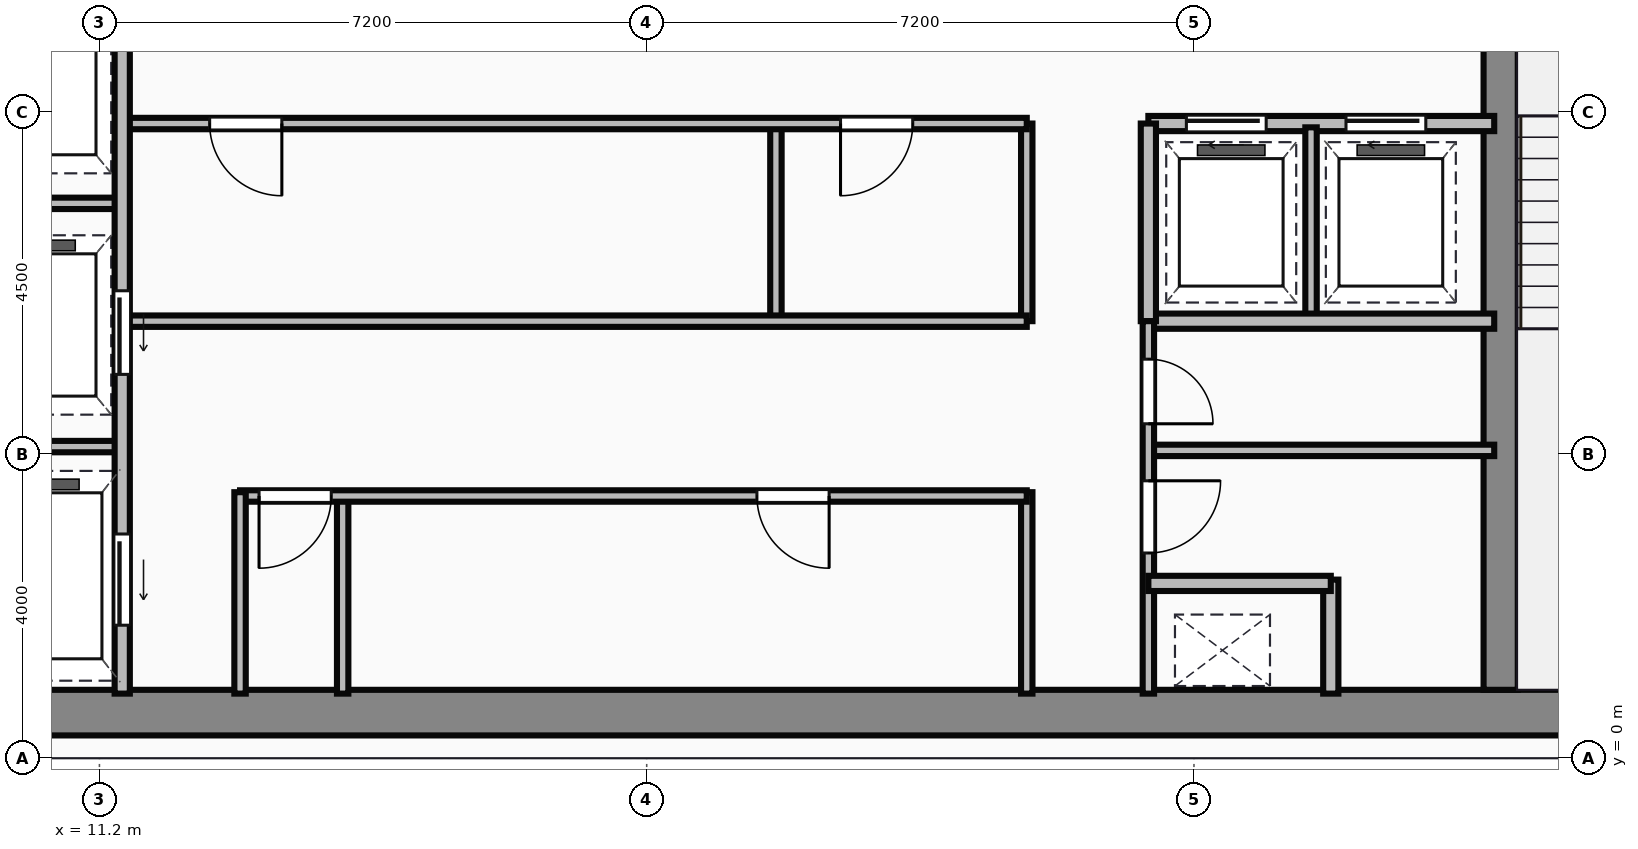
"""IFC4 building model, lengths in metres.
Left out: names, types, materials, properties, quantities, classifications, styles, units other than length and angle.
Written with IfcOpenShell. Run it as: python <this file> out.ifc"""

import sys

from ifc_helpers import new_model, si_unit, direction, frame, frame_2d, origin, place, context, subcontext, project, spatial, rectangle, extrude, source, transform, mapped, element, fill, save


model = new_model("IFC4")
c1 = context("Model", 3, precision=1e-05, world=origin(), true_north=direction((0.0, 1.0)))
c2 = subcontext(c1, "Body", "Model", "MODEL_VIEW")
j1 = project(units=[si_unit("LENGTHUNIT", "METRE"), si_unit("PLANEANGLEUNIT", "RADIAN")], contexts=[c1])
p1 = place(None, origin())
s1 = spatial("IfcSite", under=j1, at=p1, CompositionType="ELEMENT")
p2 = place(p1, origin())
s2 = spatial("IfcBuilding", under=s1, at=p2, CompositionType="ELEMENT")
p3 = place(p2, frame((0.0, 0.0, 244.2)))
s3 = spatial("IfcBuildingStorey", under=s2, at=p3, CompositionType="ELEMENT", Elevation=244.2)
m1 = source(origin(), c2, "Body", "SweptSolid", [
    extrude(rectangle(XDim=29.5, YDim=0.6, at=frame_2d((14.75, 0.0))), origin(), (0.0, 0.0, 1.0), 3.65),
])
p4 = place(p3, frame((4.5, 0.6, 0.0), z_axis=(0.0, 0.0, 1.0), x_axis=(1.0, 0.0, 0.0)))
e1 = element("IfcWall", 1, at=p4, inside=s3, PredefinedType="SHEAR", context=c2, shape_type="MappedRepresentation", body=[
    mapped(m1, transform((0.0, 0.0, 0.0))),
])
m2 = source(origin(), c2, "Body", "SweptSolid", [
    extrude(rectangle(XDim=12.5, YDim=0.45, at=frame_2d((6.25, 0.0))), origin(), (0.0, 0.0, 1.0), 3.65),
])
p5 = place(p3, frame((29.635, 0.9, 0.0), z_axis=(0.0, 0.0, 1.0), x_axis=(0.0, 1.0, 0.0)))
e2 = element("IfcWall", 2, at=p5, inside=s3, PredefinedType="SHEAR", context=c2, shape_type="MappedRepresentation", body=[
    mapped(m2, transform((0.0, 0.0, 0.0))),
])
m3 = source(origin(), c2, "Body", "SweptSolid", [
    extrude(rectangle(XDim=9.6, YDim=0.2, at=frame_2d((4.8, 0.0))), origin(), (0.0, 0.0, 1.0), 3.4),
])
p6 = place(p3, frame((11.5, 0.85, 0.0), z_axis=(0.0, 0.0, 1.0), x_axis=(0.0, 1.0, 0.0)))
e3 = element("IfcWall", 3, at=p6, inside=s3, PredefinedType="PARTITIONING", context=c2, shape_type="MappedRepresentation", body=[
    mapped(m3, transform((0.0, 0.0, 0.0))),
])
p7 = place(p6, frame((4.2, 0.0, 0.0)))
e4 = element("IfcOpeningElement", 4, at=p7, cuts=e3, PredefinedType="OPENING", context=c2, shape_type="SweptSolid", body=[
    extrude(rectangle(XDim=1.1, YDim=2.15, at=frame_2d((0.55, 1.075))), frame((0.0, 0.11, 0.0), z_axis=(0.0, -1.0, 0.0), x_axis=(1.0, 0.0, 0.0)), (0.0, 0.0, 1.0), 0.22),
])
p8 = place(p6, frame((0.9, 0.0, 0.0)))
e5 = element("IfcOpeningElement", 5, at=p8, cuts=e3, PredefinedType="OPENING", context=c2, shape_type="SweptSolid", body=[
    extrude(rectangle(XDim=1.2, YDim=2.15, at=frame_2d((0.6, 1.075))), frame((0.0, 0.11, 0.0), z_axis=(0.0, -1.0, 0.0), x_axis=(1.0, 0.0, 0.0)), (0.0, 0.0, 1.0), 0.22),
])
m4 = source(origin(), c2, "Body", "SweptSolid", [
    extrude(rectangle(XDim=2.4, YDim=0.15, at=frame_2d((1.2, 0.0))), origin(), (0.0, 0.0, 1.0), 3.4),
])
for number, where, z_axis, x_axis in (
    (6, (9.1, 4.1, 0.0), (0.0, 0.0, 1.0), (1.0, 0.0, 0.0)),
    (7, (9.1, 7.3, 0.0), (0.0, 0.0, 1.0), (1.0, 0.0, 0.0)),
):
    element("IfcWall", number, at=place(p3, frame(where, z_axis=z_axis, x_axis=x_axis)), inside=s3, PredefinedType="PARTITIONING", context=c2, shape_type="MappedRepresentation", body=[
        mapped(m4, transform((0.0, 0.0, 0.0))),
    ])
m5 = source(origin(), c2, "Body", "SweptSolid", [
    extrude(rectangle(XDim=2.65, YDim=0.15, at=frame_2d((1.325, 0.0))), origin(), (0.0, 0.0, 1.0), 3.4),
])
p9 = place(p3, frame((13.05, 0.85, 0.0), z_axis=(0.0, 0.0, 1.0), x_axis=(0.0, 1.0, 0.0)))
e8 = element("IfcWall", 8, at=p9, inside=s3, PredefinedType="PARTITIONING", context=c2, shape_type="MappedRepresentation", body=[
    mapped(m5, transform((0.0, 0.0, 0.0))),
])
m6 = source(origin(), c2, "Body", "SweptSolid", [
    extrude(rectangle(XDim=10.35, YDim=0.15, at=frame_2d((5.175, 0.0))), origin(), (0.0, 0.0, 1.0), 3.4),
])
p10 = place(p3, frame((13.05, 3.45, 0.0), z_axis=(0.0, 0.0, 1.0), x_axis=(1.0, 0.0, 0.0)))
e9 = element("IfcWall", 9, at=p10, inside=s3, PredefinedType="PARTITIONING", context=c2, shape_type="MappedRepresentation", body=[
    mapped(m6, transform((0.0, 0.0, 0.0))),
])
p11 = place(p10, frame((0.25, 0.0, 0.0)))
e10 = element("IfcOpeningElement", 10, at=p11, cuts=e9, PredefinedType="OPENING", context=c2, shape_type="SweptSolid", body=[
    extrude(rectangle(XDim=0.95, YDim=2.15, at=frame_2d((0.475, 1.075))), frame((0.0, 0.085, 0.0), z_axis=(0.0, -1.0, 0.0), x_axis=(1.0, 0.0, 0.0)), (0.0, 0.0, 1.0), 0.17),
])
p12 = place(p10, frame((6.8, 0.0, 0.0)))
e11 = element("IfcOpeningElement", 11, at=p12, cuts=e9, PredefinedType="OPENING", context=c2, shape_type="SweptSolid", body=[
    extrude(rectangle(XDim=0.95, YDim=2.15, at=frame_2d((0.475, 1.075))), frame((0.0, 0.085, 0.0), z_axis=(0.0, -1.0, 0.0), x_axis=(1.0, 0.0, 0.0)), (0.0, 0.0, 1.0), 0.17),
])
p13 = place(p3, frame((23.4, 0.85, 0.0), z_axis=(0.0, 0.0, 1.0), x_axis=(0.0, 1.0, 0.0)))
e12 = element("IfcWall", 12, at=p13, inside=s3, PredefinedType="PARTITIONING", context=c2, shape_type="MappedRepresentation", body=[
    mapped(m5, transform((0.0, 0.0, 0.0))),
])
m7 = source(origin(), c2, "Body", "SweptSolid", [
    extrude(rectangle(XDim=2.6, YDim=0.15, at=frame_2d((1.3, 0.0))), origin(), (0.0, 0.0, 1.0), 3.4),
])
p14 = place(p3, frame((14.4, 0.85, 0.0), z_axis=(0.0, 0.0, 1.0), x_axis=(0.0, 1.0, 0.0)))
e13 = element("IfcWall", 13, at=p14, inside=s3, PredefinedType="PARTITIONING", context=c2, shape_type="MappedRepresentation", body=[
    mapped(m7, transform((0.0, 0.0, 0.0))),
])
m8 = source(origin(), c2, "Body", "SweptSolid", [
    extrude(rectangle(XDim=11.85, YDim=0.15, at=frame_2d((5.925, 0.0))), origin(), (0.0, 0.0, 1.0), 3.4),
])
p15 = place(p3, frame((11.55, 5.75, 0.0), z_axis=(0.0, 0.0, 1.0), x_axis=(1.0, 0.0, 0.0)))
e14 = element("IfcWall", 14, at=p15, inside=s3, PredefinedType="PARTITIONING", context=c2, shape_type="MappedRepresentation", body=[
    mapped(m8, transform((0.0, 0.0, 0.0))),
])
p16 = place(p3, frame((11.55, 8.35, 0.0), z_axis=(0.0, 0.0, 1.0), x_axis=(1.0, 0.0, 0.0)))
e15 = element("IfcWall", 15, at=p16, inside=s3, PredefinedType="PARTITIONING", context=c2, shape_type="MappedRepresentation", body=[
    mapped(m8, transform((0.0, 0.0, 0.0))),
])
p17 = place(p16, frame((1.1, 0.0, 0.0)))
e16 = element("IfcOpeningElement", 16, at=p17, cuts=e15, PredefinedType="OPENING", context=c2, shape_type="SweptSolid", body=[
    extrude(rectangle(XDim=0.95, YDim=2.15, at=frame_2d((0.475, 1.075))), frame((0.0, 0.085, 0.0), z_axis=(0.0, -1.0, 0.0), x_axis=(1.0, 0.0, 0.0)), (0.0, 0.0, 1.0), 0.17),
])
p18 = place(p16, frame((9.4, 0.0, 0.0)))
e17 = element("IfcOpeningElement", 17, at=p18, cuts=e15, PredefinedType="OPENING", context=c2, shape_type="SweptSolid", body=[
    extrude(rectangle(XDim=0.95, YDim=2.15, at=frame_2d((0.475, 1.075))), frame((0.0, 0.085, 0.0), z_axis=(0.0, -1.0, 0.0), x_axis=(1.0, 0.0, 0.0)), (0.0, 0.0, 1.0), 0.17),
])
m9 = source(origin(), c2, "Body", "SweptSolid", [
    extrude(rectangle(XDim=2.6, YDim=0.15, at=frame_2d((1.3, 0.0))), origin(), (0.0, 0.0, 1.0), 3.4),
])
p19 = place(p3, frame((23.4, 5.75, 0.0), z_axis=(0.0, 0.0, 1.0), x_axis=(0.0, 1.0, 0.0)))
e18 = element("IfcWall", 18, at=p19, inside=s3, PredefinedType="PARTITIONING", context=c2, shape_type="MappedRepresentation", body=[
    mapped(m9, transform((0.0, 0.0, 0.0))),
])
m10 = source(origin(), c2, "Body", "SweptSolid", [
    extrude(rectangle(XDim=2.5, YDim=0.15, at=frame_2d((1.25, 0.0))), origin(), (0.0, 0.0, 1.0), 3.4),
])
p20 = place(p3, frame((20.1, 5.8, 0.0), z_axis=(0.0, 0.0, 1.0), x_axis=(0.0, 1.0, 0.0)))
e19 = element("IfcWall", 19, at=p20, inside=s3, PredefinedType="PARTITIONING", context=c2, shape_type="MappedRepresentation", body=[
    mapped(m10, transform((0.0, 0.0, 0.0))),
])
m11 = source(origin(), c2, "Body", "SweptSolid", [
    extrude(rectangle(XDim=4.55, YDim=0.2, at=frame_2d((2.275, 0.0))), origin(), (0.0, 0.0, 1.0), 3.4),
])
p21 = place(p3, frame((25.0, 8.35, 0.0), z_axis=(0.0, 0.0, 1.0), x_axis=(1.0, 0.0, 0.0)))
e20 = element("IfcWall", 20, at=p21, inside=s3, PredefinedType="PARTITIONING", context=c2, shape_type="MappedRepresentation", body=[
    mapped(m11, transform((0.0, 0.0, 0.0))),
])
p22 = place(p21, frame((0.5, 0.0, 0.0)))
e21 = element("IfcOpeningElement", 21, at=p22, cuts=e20, PredefinedType="OPENING", context=c2, shape_type="SweptSolid", body=[
    extrude(rectangle(XDim=1.05, YDim=2.15, at=frame_2d((0.525, 1.075))), frame((0.0, 0.11, 0.0), z_axis=(0.0, -1.0, 0.0), x_axis=(1.0, 0.0, 0.0)), (0.0, 0.0, 1.0), 0.22),
])
p23 = place(p21, frame((2.6, 0.0, 0.0)))
e22 = element("IfcOpeningElement", 22, at=p23, cuts=e20, PredefinedType="OPENING", context=c2, shape_type="SweptSolid", body=[
    extrude(rectangle(XDim=1.05, YDim=2.15, at=frame_2d((0.525, 1.075))), frame((0.0, 0.11, 0.0), z_axis=(0.0, -1.0, 0.0), x_axis=(1.0, 0.0, 0.0)), (0.0, 0.0, 1.0), 0.22),
])
p24 = place(p3, frame((25.0, 5.75, 0.0), z_axis=(0.0, 0.0, 1.0), x_axis=(1.0, 0.0, 0.0)))
e23 = element("IfcWall", 23, at=p24, inside=s3, PredefinedType="PARTITIONING", context=c2, shape_type="MappedRepresentation", body=[
    mapped(m11, transform((0.0, 0.0, 0.0))),
])
m12 = source(origin(), c2, "Body", "SweptSolid", [
    extrude(rectangle(XDim=2.6, YDim=0.2, at=frame_2d((1.3, 0.0))), origin(), (0.0, 0.0, 1.0), 3.4),
])
p25 = place(p3, frame((25.0, 5.75, 0.0), z_axis=(0.0, 0.0, 1.0), x_axis=(0.0, 1.0, 0.0)))
e24 = element("IfcWall", 24, at=p25, inside=s3, PredefinedType="PARTITIONING", context=c2, shape_type="MappedRepresentation", body=[
    mapped(m12, transform((0.0, 0.0, 0.0))),
])
p26 = place(p3, frame((27.14, 5.8, 0.0), z_axis=(0.0, 0.0, 1.0), x_axis=(0.0, 1.0, 0.0)))
e25 = element("IfcWall", 25, at=p26, inside=s3, PredefinedType="PARTITIONING", context=c2, shape_type="MappedRepresentation", body=[
    mapped(m10, transform((0.0, 0.0, 0.0))),
])
m13 = source(origin(), c2, "Body", "SweptSolid", [
    extrude(rectangle(XDim=4.9, YDim=0.15, at=frame_2d((2.45, 0.0))), origin(), (0.0, 0.0, 1.0), 3.4),
])
p27 = place(p3, frame((25.0, 0.85, 0.0), z_axis=(0.0, 0.0, 1.0), x_axis=(0.0, 1.0, 0.0)))
e26 = element("IfcWall", 26, at=p27, inside=s3, PredefinedType="PARTITIONING", context=c2, shape_type="MappedRepresentation", body=[
    mapped(m13, transform((0.0, 0.0, 0.0))),
])
p28 = place(p27, frame((1.85, 0.0, 0.0)))
e27 = element("IfcOpeningElement", 27, at=p28, cuts=e26, PredefinedType="OPENING", context=c2, shape_type="SweptSolid", body=[
    extrude(rectangle(XDim=0.95, YDim=2.15, at=frame_2d((0.475, 1.075))), frame((0.0, 0.085, 0.0), z_axis=(0.0, -1.0, 0.0), x_axis=(1.0, 0.0, 0.0)), (0.0, 0.0, 1.0), 0.17),
])
p29 = place(p27, frame((3.55, 0.0, 0.0)))
e28 = element("IfcOpeningElement", 28, at=p29, cuts=e26, PredefinedType="OPENING", context=c2, shape_type="SweptSolid", body=[
    extrude(rectangle(XDim=0.85, YDim=2.15, at=frame_2d((0.425, 1.075))), frame((0.0, 0.085, 0.0), z_axis=(0.0, -1.0, 0.0), x_axis=(1.0, 0.0, 0.0)), (0.0, 0.0, 1.0), 0.17),
])
m14 = source(origin(), c2, "Body", "SweptSolid", [
    extrude(rectangle(XDim=2.4, YDim=0.2, at=frame_2d((1.2, 0.0))), origin(), (0.0, 0.0, 1.0), 3.4),
])
p30 = place(p3, frame((25.0, 2.3, 0.0), z_axis=(0.0, 0.0, 1.0), x_axis=(1.0, 0.0, 0.0)))
e29 = element("IfcWall", 29, at=p30, inside=s3, PredefinedType="PARTITIONING", context=c2, shape_type="MappedRepresentation", body=[
    mapped(m14, transform((0.0, 0.0, 0.0))),
])
m15 = source(origin(), c2, "Body", "SweptSolid", [
    extrude(rectangle(XDim=1.5, YDim=0.2, at=frame_2d((0.75, 0.0))), origin(), (0.0, 0.0, 1.0), 3.4),
])
p31 = place(p3, frame((27.4, 0.85, 0.0), z_axis=(0.0, 0.0, 1.0), x_axis=(0.0, 1.0, 0.0)))
e30 = element("IfcWall", 30, at=p31, inside=s3, PredefinedType="PARTITIONING", context=c2, shape_type="MappedRepresentation", body=[
    mapped(m15, transform((0.0, 0.0, 0.0))),
])
m16 = source(origin(), c2, "Body", "SweptSolid", [
    extrude(rectangle(XDim=4.55, YDim=0.15, at=frame_2d((2.275, 0.0))), origin(), (0.0, 0.0, 1.0), 3.4),
])
p32 = place(p3, frame((25.0, 4.05, 0.0), z_axis=(0.0, 0.0, 1.0), x_axis=(1.0, 0.0, 0.0)))
e31 = element("IfcWall", 31, at=p32, inside=s3, PredefinedType="PARTITIONING", context=c2, shape_type="MappedRepresentation", body=[
    mapped(m16, transform((0.0, 0.0, 0.0))),
])
m17 = source(origin(), c2, "Body", "SweptSolid", [
    extrude(rectangle(XDim=1.1, YDim=2.15, at=frame_2d((0.55, 1.075))), frame((0.0, 0.025, 0.0), z_axis=(0.0, -1.0, 0.0), x_axis=(1.0, 0.0, 0.0)), (0.0, 0.0, 1.0), 0.05),
])
p33 = place(p7, frame((1.1, 0.0, 0.0), z_axis=(0.0, 0.0, 1.0), x_axis=(-1.0, 0.0, 0.0)))
e32 = element("IfcDoor", 32, at=p33, inside=s3, OperationType="SLIDING_TO_LEFT", PredefinedType="DOOR", context=c2, shape_type="MappedRepresentation", body=[
    mapped(m17, transform((0.0, 0.0, 0.0))),
])
fill(e4, e32)
m18 = source(origin(), c2, "Body", "SweptSolid", [
    extrude(rectangle(XDim=1.2, YDim=2.15, at=frame_2d((0.6, 1.075))), frame((0.0, 0.025, 0.0), z_axis=(0.0, -1.0, 0.0), x_axis=(1.0, 0.0, 0.0)), (0.0, 0.0, 1.0), 0.05),
])
p34 = place(p8, frame((1.2, 0.0, 0.0), z_axis=(0.0, 0.0, 1.0), x_axis=(-1.0, 0.0, 0.0)))
e33 = element("IfcDoor", 33, at=p34, inside=s3, OperationType="SLIDING_TO_LEFT", PredefinedType="DOOR", context=c2, shape_type="MappedRepresentation", body=[
    mapped(m18, transform((0.0, 0.0, 0.0))),
])
fill(e5, e33)
m19 = source(origin(), c2, "Body", "SweptSolid", [
    extrude(rectangle(XDim=0.95, YDim=2.15, at=frame_2d((0.475, 1.075))), frame((0.0, 0.025, 0.0), z_axis=(0.0, -1.0, 0.0), x_axis=(1.0, 0.0, 0.0)), (0.0, 0.0, 1.0), 0.05),
])
p35 = place(p11, origin())
e34 = element("IfcDoor", 34, at=p35, inside=s3, OperationType="SINGLE_SWING_LEFT", PredefinedType="DOOR", context=c2, shape_type="MappedRepresentation", body=[
    mapped(m19, transform((0.0, 0.0, 0.0))),
])
fill(e10, e34)
p36 = place(p12, origin())
e35 = element("IfcDoor", 35, at=p36, inside=s3, OperationType="SINGLE_SWING_RIGHT", PredefinedType="DOOR", context=c2, shape_type="MappedRepresentation", body=[
    mapped(m19, transform((0.0, 0.0, 0.0))),
])
fill(e11, e35)
p37 = place(p17, origin())
e36 = element("IfcDoor", 36, at=p37, inside=s3, OperationType="SINGLE_SWING_RIGHT", PredefinedType="DOOR", context=c2, shape_type="MappedRepresentation", body=[
    mapped(m19, transform((0.0, 0.0, 0.0))),
])
fill(e16, e36)
p38 = place(p18, origin())
e37 = element("IfcDoor", 37, at=p38, inside=s3, OperationType="SINGLE_SWING_LEFT", PredefinedType="DOOR", context=c2, shape_type="MappedRepresentation", body=[
    mapped(m19, transform((0.0, 0.0, 0.0))),
])
fill(e17, e37)
m20 = source(origin(), c2, "Body", "SweptSolid", [
    extrude(rectangle(XDim=1.05, YDim=2.15, at=frame_2d((0.525, 1.075))), frame((0.0, 0.025, 0.0), z_axis=(0.0, -1.0, 0.0), x_axis=(1.0, 0.0, 0.0)), (0.0, 0.0, 1.0), 0.05),
])
p39 = place(p22, origin())
e38 = element("IfcDoor", 38, at=p39, inside=s3, OperationType="SLIDING_TO_LEFT", PredefinedType="DOOR", context=c2, shape_type="MappedRepresentation", body=[
    mapped(m20, transform((0.0, 0.0, 0.0))),
])
fill(e21, e38)
p40 = place(p23, origin())
e39 = element("IfcDoor", 39, at=p40, inside=s3, OperationType="SLIDING_TO_LEFT", PredefinedType="DOOR", context=c2, shape_type="MappedRepresentation", body=[
    mapped(m20, transform((0.0, 0.0, 0.0))),
])
fill(e22, e39)
p41 = place(p28, origin())
e40 = element("IfcDoor", 40, at=p41, inside=s3, OperationType="SINGLE_SWING_RIGHT", PredefinedType="DOOR", context=c2, shape_type="MappedRepresentation", body=[
    mapped(m19, transform((0.0, 0.0, 0.0))),
])
fill(e27, e40)
m21 = source(origin(), c2, "Body", "SweptSolid", [
    extrude(rectangle(XDim=0.85, YDim=2.15, at=frame_2d((0.425, 1.075))), frame((0.0, 0.025, 0.0), z_axis=(0.0, -1.0, 0.0), x_axis=(1.0, 0.0, 0.0)), (0.0, 0.0, 1.0), 0.05),
])
p42 = place(p29, origin())
e41 = element("IfcDoor", 41, at=p42, inside=s3, OperationType="SINGLE_SWING_LEFT", PredefinedType="DOOR", context=c2, shape_type="MappedRepresentation", body=[
    mapped(m21, transform((0.0, 0.0, 0.0))),
])
fill(e28, e41)
save(model, sys.argv[1])
